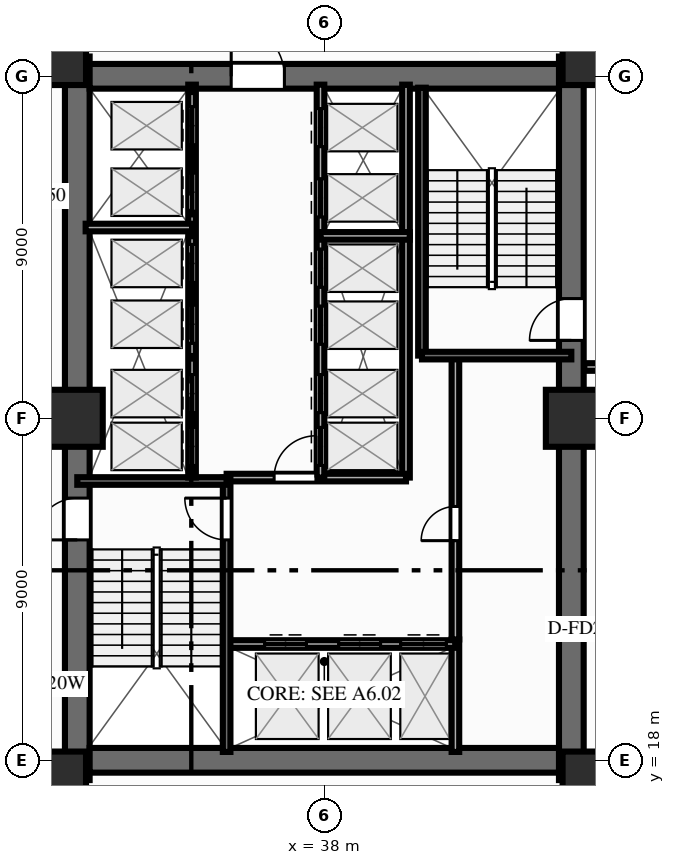
"""IFC4 building model, lengths in metres.
Left out: names, types, materials, properties, quantities, classifications, styles, units other than length and angle.
Written with IfcOpenShell. Run it as: python <this file> out.ifc"""

import sys

from ifc_helpers import new_model, si_unit, direction, frame, frame_2d, origin, origin_2d, place, context, subcontext, project, spatial, rectangle, extrude, source, transform, mapped, element, fill, save


model = new_model("IFC4")
c1 = context("Model", 3, precision=1e-05, world=origin(), true_north=direction((0.0, 1.0)))
c2 = subcontext(c1, "Body", "Model", "MODEL_VIEW")
j1 = project(units=[si_unit("LENGTHUNIT", "METRE"), si_unit("PLANEANGLEUNIT", "RADIAN")], contexts=[c1])
p1 = place(None, origin())
s1 = spatial("IfcSite", under=j1, at=p1, CompositionType="ELEMENT")
p2 = place(p1, origin())
s2 = spatial("IfcBuilding", under=s1, at=p2, CompositionType="ELEMENT")
p3 = place(p2, origin())
s3 = spatial("IfcBuildingStorey", under=s2, at=p3, CompositionType="ELEMENT", Elevation=0.0)
p4 = place(p3, frame((31.5, 17.48, 0.0), z_axis=(0.0, 0.0, 1.0), x_axis=(0.0, 1.0, 0.0)))
e1 = element("IfcWall", 1, at=p4, inside=s3, PredefinedType="SHEAR", context=c2, shape_type="SweptSolid", body=[
    extrude(rectangle(XDim=19.04, YDim=0.65, at=frame_2d((9.52, 0.0))), origin(), (0.0, 0.0, 1.0), 4.2),
])
p5 = place(p4, frame((6.32, 0.0, 0.0)))
e2 = element("IfcOpeningElement", 2, at=p5, cuts=e1, PredefinedType="OPENING", context=c2, shape_type="SweptSolid", body=[
    extrude(rectangle(XDim=1.1, YDim=2.15, at=frame_2d((0.55, 1.075))), frame((0.0, 0.337, 0.0), z_axis=(0.0, -1.0, 0.0), x_axis=(1.0, 0.0, 0.0)), (0.0, 0.0, 1.0), 0.674),
])
p6 = place(p3, frame((44.5, 17.48, 0.0), z_axis=(0.0, 0.0, 1.0), x_axis=(0.0, 1.0, 0.0)))
e3 = element("IfcWall", 3, at=p6, inside=s3, PredefinedType="SHEAR", context=c2, shape_type="SweptSolid", body=[
    extrude(rectangle(XDim=19.04, YDim=0.65, at=frame_2d((9.52, 0.0))), origin(), (0.0, 0.0, 1.0), 4.2),
])
p7 = place(p6, frame((12.67, 0.0, 0.0), z_axis=(0.0, 0.0, 1.0), x_axis=(-1.0, 0.0, 0.0)))
e4 = element("IfcOpeningElement", 4, at=p7, cuts=e3, PredefinedType="OPENING", context=c2, shape_type="SweptSolid", body=[
    extrude(rectangle(XDim=1.1, YDim=2.15, at=frame_2d((0.55, 1.075))), frame((0.0, 0.337, 0.0), z_axis=(0.0, -1.0, 0.0), x_axis=(1.0, 0.0, 0.0)), (0.0, 0.0, 1.0), 0.674),
])
p8 = place(p3, frame((31.825, 18.0, 0.0), z_axis=(0.0, 0.0, 1.0), x_axis=(1.0, 0.0, 0.0)))
e5 = element("IfcWall", 5, at=p8, inside=s3, PredefinedType="SHEAR", context=c2, shape_type="SweptSolid", body=[
    extrude(rectangle(XDim=12.35, YDim=0.65, at=frame_2d((6.175, 0.0))), origin(), (0.0, 0.0, 1.0), 4.2),
])
p9 = place(p3, frame((31.825, 36.0, 0.0), z_axis=(0.0, 0.0, 1.0), x_axis=(1.0, 0.0, 0.0)))
e6 = element("IfcWall", 6, at=p9, inside=s3, PredefinedType="SHEAR", context=c2, shape_type="SweptSolid", body=[
    extrude(rectangle(XDim=12.35, YDim=0.65, at=frame_2d((6.175, 0.0))), origin(), (0.0, 0.0, 1.0), 4.2),
])
p10 = place(p9, frame((5.125, 0.0, 0.0), z_axis=(0.0, 0.0, 1.0), x_axis=(-1.0, 0.0, 0.0)))
e7 = element("IfcOpeningElement", 7, at=p10, cuts=e6, PredefinedType="OPENING", context=c2, shape_type="SweptSolid", body=[
    extrude(rectangle(XDim=1.4, YDim=2.15, at=frame_2d((0.7, 1.075))), frame((0.0, 0.337, 0.0), z_axis=(0.0, -1.0, 0.0), x_axis=(1.0, 0.0, 0.0)), (0.0, 0.0, 1.0), 0.674),
])
m1 = source(origin(), c2, "Body", "SweptSolid", [
    extrude(rectangle(XDim=1.5, YDim=1.5, at=origin_2d()), origin(), (0.0, 0.0, 1.0), 4.2),
])
for number, where, z_axis, x_axis in (
    (8, (30.98, 17.48, 0.0), (0.0, 0.0, 1.0), (1.0, 0.0, 0.0)),
    (9, (45.02, 17.48, 0.0), (0.0, 0.0, 1.0), (1.0, 0.0, 0.0)),
    (10, (30.98, 36.52, 0.0), (0.0, 0.0, 1.0), (1.0, 0.0, 0.0)),
    (11, (45.02, 36.52, 0.0), (0.0, 0.0, 1.0), (1.0, 0.0, 0.0)),
    (12, (31.42, 27.0, 0.0), (0.0, 0.0, 1.0), (1.0, 0.0, 0.0)),
    (13, (44.58, 27.0, 0.0), (0.0, 0.0, 1.0), (1.0, 0.0, 0.0)),
):
    element("IfcColumn", number, at=place(p3, frame(where, z_axis=z_axis, x_axis=x_axis)), inside=s3, PredefinedType="COLUMN", context=c2, shape_type="MappedRepresentation", body=[
        mapped(m1, transform((0.0, 0.0, 0.0), scale=1.0)),
    ])
p11 = place(p3, frame((41.45, 18.22, 0.0), z_axis=(0.0, 0.0, 1.0), x_axis=(0.0, 1.0, 0.0)))
e14 = element("IfcWall", 14, at=p11, inside=s3, PredefinedType="PARTITIONING", context=c2, shape_type="SweptSolid", body=[
    extrude(rectangle(XDim=2.96, YDim=0.2, at=frame_2d((1.48, 0.0))), origin(), (0.0, 0.0, 1.0), 3.92),
])
p12 = place(p3, frame((41.45, 21.18, 0.0), z_axis=(0.0, 0.0, 1.0), x_axis=(0.0, 1.0, 0.0)))
e15 = element("IfcWall", 15, at=p12, inside=s3, PredefinedType="PARTITIONING", context=c2, shape_type="SweptSolid", body=[
    extrude(rectangle(XDim=7.42, YDim=0.2, at=frame_2d((3.71, 0.0))), origin(), (0.0, 0.0, 1.0), 3.92),
])
p13 = place(p12, frame((2.6, 0.0, 0.0)))
e16 = element("IfcOpeningElement", 16, at=p13, cuts=e15, PredefinedType="OPENING", context=c2, shape_type="SweptSolid", body=[
    extrude(rectangle(XDim=0.9, YDim=2.1, at=frame_2d((0.45, 1.05))), frame((0.0, 0.112, 0.0), z_axis=(0.0, -1.0, 0.0), x_axis=(1.0, 0.0, 0.0)), (0.0, 0.0, 1.0), 0.224),
])
p14 = place(p3, frame((40.15, 25.44, 0.0), z_axis=(0.0, 0.0, 1.0), x_axis=(0.0, 1.0, 0.0)))
e17 = element("IfcWall", 17, at=p14, inside=s3, PredefinedType="PARTITIONING", context=c2, shape_type="SweptSolid", body=[
    extrude(rectangle(XDim=6.36, YDim=0.2, at=frame_2d((3.18, 0.0))), origin(), (0.0, 0.0, 1.0), 3.92),
])
p15 = place(p3, frame((40.15, 31.8, 0.0), z_axis=(0.0, 0.0, 1.0), x_axis=(0.0, 1.0, 0.0)))
e18 = element("IfcWall", 18, at=p15, inside=s3, PredefinedType="PARTITIONING", context=c2, shape_type="SweptSolid", body=[
    extrude(rectangle(XDim=3.98, YDim=0.2, at=frame_2d((1.99, 0.0))), origin(), (0.0, 0.0, 1.0), 3.92),
])
p16 = place(p3, frame((35.43, 21.06, 0.0), z_axis=(0.0, 0.0, 1.0), x_axis=(1.0, 0.0, 0.0)))
e19 = element("IfcWall", 19, at=p16, inside=s3, PredefinedType="PARTITIONING", context=c2, shape_type="SweptSolid", body=[
    extrude(rectangle(XDim=6.02, YDim=0.2, at=frame_2d((3.01, 0.0))), origin(), (0.0, 0.0, 1.0), 3.92),
])
p17 = place(p16, frame((1.0, 0.0, 0.0)))
e20 = element("IfcOpeningElement", 20, at=p17, cuts=e19, PredefinedType="OPENING", context=c2, shape_type="SweptSolid", body=[
    extrude(rectangle(XDim=1.1, YDim=2.15, at=frame_2d((0.55, 1.075))), frame((0.0, 0.112, 0.0), z_axis=(0.0, -1.0, 0.0), x_axis=(1.0, 0.0, 0.0)), (0.0, 0.0, 1.0), 0.224),
])
p18 = place(p16, frame((2.95, 0.0, 0.0)))
e21 = element("IfcOpeningElement", 21, at=p18, cuts=e19, PredefinedType="OPENING", context=c2, shape_type="SweptSolid", body=[
    extrude(rectangle(XDim=1.1, YDim=2.15, at=frame_2d((0.55, 1.075))), frame((0.0, 0.112, 0.0), z_axis=(0.0, -1.0, 0.0), x_axis=(1.0, 0.0, 0.0)), (0.0, 0.0, 1.0), 0.224),
])
p19 = place(p16, frame((4.58, 0.0, 0.0)))
e22 = element("IfcOpeningElement", 22, at=p19, cuts=e19, PredefinedType="OPENING", context=c2, shape_type="SweptSolid", body=[
    extrude(rectangle(XDim=1.2, YDim=2.15, at=frame_2d((0.6, 1.075))), frame((0.0, 0.112, 0.0), z_axis=(0.0, -1.0, 0.0), x_axis=(1.0, 0.0, 0.0)), (0.0, 0.0, 1.0), 0.224),
])
p20 = place(p3, frame((35.43, 25.44, 0.0), z_axis=(0.0, 0.0, 1.0), x_axis=(1.0, 0.0, 0.0)))
e23 = element("IfcWall", 23, at=p20, inside=s3, PredefinedType="PARTITIONING", context=c2, shape_type="SweptSolid", body=[
    extrude(rectangle(XDim=4.72, YDim=0.2, at=frame_2d((2.36, 0.0))), origin(), (0.0, 0.0, 1.0), 3.92),
])
p21 = place(p20, frame((1.25, 0.0, 0.0)))
e24 = element("IfcOpeningElement", 24, at=p21, cuts=e23, PredefinedType="OPENING", context=c2, shape_type="SweptSolid", body=[
    extrude(rectangle(XDim=1.1, YDim=2.15, at=frame_2d((0.55, 1.075))), frame((0.0, 0.112, 0.0), z_axis=(0.0, -1.0, 0.0), x_axis=(1.0, 0.0, 0.0)), (0.0, 0.0, 1.0), 0.224),
])
p22 = place(p3, frame((35.43, 18.22, 0.0), z_axis=(0.0, 0.0, 1.0), x_axis=(0.0, 1.0, 0.0)))
e25 = element("IfcWall", 25, at=p22, inside=s3, PredefinedType="SOLIDWALL", context=c2, shape_type="SweptSolid", body=[
    extrude(rectangle(XDim=7.22, YDim=0.2, at=frame_2d((3.61, 0.0))), origin(), (0.0, 0.0, 1.0), 3.92),
])
p23 = place(p22, frame((6.68, 0.0, 0.0), z_axis=(0.0, 0.0, 1.0), x_axis=(-1.0, 0.0, 0.0)))
e26 = element("IfcOpeningElement", 26, at=p23, cuts=e25, PredefinedType="OPENING", context=c2, shape_type="SweptSolid", body=[
    extrude(rectangle(XDim=1.1, YDim=2.15, at=frame_2d((0.55, 1.075))), frame((0.0, 0.112, 0.0), z_axis=(0.0, -1.0, 0.0), x_axis=(1.0, 0.0, 0.0)), (0.0, 0.0, 1.0), 0.224),
])
p24 = place(p3, frame((31.5, 25.35, 0.0), z_axis=(0.0, 0.0, 1.0), x_axis=(1.0, 0.0, 0.0)))
e27 = element("IfcWall", 27, at=p24, inside=s3, PredefinedType="SOLIDWALL", context=c2, shape_type="SweptSolid", body=[
    extrude(rectangle(XDim=3.93, YDim=0.2, at=frame_2d((1.965, 0.0))), origin(), (0.0, 0.0, 1.0), 3.92),
])
p25 = place(p3, frame((40.57, 28.65, 0.0), z_axis=(0.0, 0.0, 1.0), x_axis=(0.0, 1.0, 0.0)))
e28 = element("IfcWall", 28, at=p25, inside=s3, PredefinedType="SOLIDWALL", context=c2, shape_type="SweptSolid", body=[
    extrude(rectangle(XDim=7.05, YDim=0.2, at=frame_2d((3.525, 0.0))), origin(), (0.0, 0.0, 1.0), 3.92),
])
p26 = place(p3, frame((40.57, 28.65, 0.0), z_axis=(0.0, 0.0, 1.0), x_axis=(1.0, 0.0, 0.0)))
e29 = element("IfcWall", 29, at=p26, inside=s3, PredefinedType="SOLIDWALL", context=c2, shape_type="SweptSolid", body=[
    extrude(rectangle(XDim=3.93, YDim=0.2, at=frame_2d((1.965, 0.0))), origin(), (0.0, 0.0, 1.0), 3.92),
])
p27 = place(p3, frame((34.52, 25.44, 0.0), z_axis=(0.0, 0.0, 1.0), x_axis=(0.0, 1.0, 0.0)))
e30 = element("IfcWall", 30, at=p27, inside=s3, PredefinedType="PARTITIONING", context=c2, shape_type="SweptSolid", body=[
    extrude(rectangle(XDim=10.34, YDim=0.2, at=frame_2d((5.17, 0.0))), origin(), (0.0, 0.0, 1.0), 3.92),
])
p28 = place(p27, frame((0.32, 0.0, 0.0)))
e31 = element("IfcOpeningElement", 31, at=p28, cuts=e30, PredefinedType="OPENING", context=c2, shape_type="SweptSolid", body=[
    extrude(rectangle(XDim=1.0, YDim=2.15, at=frame_2d((0.5, 1.075))), frame((0.0, 0.112, 0.0), z_axis=(0.0, -1.0, 0.0), x_axis=(1.0, 0.0, 0.0)), (0.0, 0.0, 1.0), 0.224),
])
p29 = place(p27, frame((1.71, 0.0, 0.0)))
e32 = element("IfcOpeningElement", 32, at=p29, cuts=e30, PredefinedType="OPENING", context=c2, shape_type="SweptSolid", body=[
    extrude(rectangle(XDim=1.0, YDim=2.15, at=frame_2d((0.5, 1.075))), frame((0.0, 0.112, 0.0), z_axis=(0.0, -1.0, 0.0), x_axis=(1.0, 0.0, 0.0)), (0.0, 0.0, 1.0), 0.224),
])
p30 = place(p27, frame((3.535, 0.0, 0.0)))
e33 = element("IfcOpeningElement", 33, at=p30, cuts=e30, PredefinedType="OPENING", context=c2, shape_type="SweptSolid", body=[
    extrude(rectangle(XDim=1.0, YDim=2.15, at=frame_2d((0.5, 1.075))), frame((0.0, 0.112, 0.0), z_axis=(0.0, -1.0, 0.0), x_axis=(1.0, 0.0, 0.0)), (0.0, 0.0, 1.0), 0.224),
])
p31 = place(p27, frame((5.135, 0.0, 0.0)))
e34 = element("IfcOpeningElement", 34, at=p31, cuts=e30, PredefinedType="OPENING", context=c2, shape_type="SweptSolid", body=[
    extrude(rectangle(XDim=1.0, YDim=2.15, at=frame_2d((0.5, 1.075))), frame((0.0, 0.112, 0.0), z_axis=(0.0, -1.0, 0.0), x_axis=(1.0, 0.0, 0.0)), (0.0, 0.0, 1.0), 0.224),
])
p32 = place(p27, frame((7.01, 0.0, 0.0)))
e35 = element("IfcOpeningElement", 35, at=p32, cuts=e30, PredefinedType="OPENING", context=c2, shape_type="SweptSolid", body=[
    extrude(rectangle(XDim=1.0, YDim=2.15, at=frame_2d((0.5, 1.075))), frame((0.0, 0.112, 0.0), z_axis=(0.0, -1.0, 0.0), x_axis=(1.0, 0.0, 0.0)), (0.0, 0.0, 1.0), 0.224),
])
p33 = place(p27, frame((8.76, 0.0, 0.0)))
e36 = element("IfcOpeningElement", 36, at=p33, cuts=e30, PredefinedType="OPENING", context=c2, shape_type="SweptSolid", body=[
    extrude(rectangle(XDim=1.0, YDim=2.15, at=frame_2d((0.5, 1.075))), frame((0.0, 0.112, 0.0), z_axis=(0.0, -1.0, 0.0), x_axis=(1.0, 0.0, 0.0)), (0.0, 0.0, 1.0), 0.224),
])
p34 = place(p3, frame((31.72, 32.02, 0.0), z_axis=(0.0, 0.0, 1.0), x_axis=(1.0, 0.0, 0.0)))
e37 = element("IfcWall", 37, at=p34, inside=s3, PredefinedType="PARTITIONING", context=c2, shape_type="SweptSolid", body=[
    extrude(rectangle(XDim=2.8, YDim=0.2, at=frame_2d((1.4, 0.0))), origin(), (0.0, 0.0, 1.0), 3.92),
])
p35 = place(p3, frame((37.9, 25.44, 0.0), z_axis=(0.0, 0.0, 1.0), x_axis=(0.0, 1.0, 0.0)))
e38 = element("IfcWall", 38, at=p35, inside=s3, PredefinedType="PARTITIONING", context=c2, shape_type="SweptSolid", body=[
    extrude(rectangle(XDim=10.34, YDim=0.2, at=frame_2d((5.17, 0.0))), origin(), (0.0, 0.0, 1.0), 3.92),
])
p36 = place(p35, frame((0.32, 0.0, 0.0)))
e39 = element("IfcOpeningElement", 39, at=p36, cuts=e38, PredefinedType="OPENING", context=c2, shape_type="SweptSolid", body=[
    extrude(rectangle(XDim=1.0, YDim=2.15, at=frame_2d((0.5, 1.075))), frame((0.0, 0.112, 0.0), z_axis=(0.0, -1.0, 0.0), x_axis=(1.0, 0.0, 0.0)), (0.0, 0.0, 1.0), 0.224),
])
p37 = place(p35, frame((1.71, 0.0, 0.0)))
e40 = element("IfcOpeningElement", 40, at=p37, cuts=e38, PredefinedType="OPENING", context=c2, shape_type="SweptSolid", body=[
    extrude(rectangle(XDim=1.0, YDim=2.15, at=frame_2d((0.5, 1.075))), frame((0.0, 0.112, 0.0), z_axis=(0.0, -1.0, 0.0), x_axis=(1.0, 0.0, 0.0)), (0.0, 0.0, 1.0), 0.224),
])
p38 = place(p35, frame((3.51, 0.0, 0.0)))
e41 = element("IfcOpeningElement", 41, at=p38, cuts=e38, PredefinedType="OPENING", context=c2, shape_type="SweptSolid", body=[
    extrude(rectangle(XDim=1.0, YDim=2.15, at=frame_2d((0.5, 1.075))), frame((0.0, 0.112, 0.0), z_axis=(0.0, -1.0, 0.0), x_axis=(1.0, 0.0, 0.0)), (0.0, 0.0, 1.0), 0.224),
])
p39 = place(p35, frame((5.01, 0.0, 0.0)))
e42 = element("IfcOpeningElement", 42, at=p39, cuts=e38, PredefinedType="OPENING", context=c2, shape_type="SweptSolid", body=[
    extrude(rectangle(XDim=1.0, YDim=2.15, at=frame_2d((0.5, 1.075))), frame((0.0, 0.112, 0.0), z_axis=(0.0, -1.0, 0.0), x_axis=(1.0, 0.0, 0.0)), (0.0, 0.0, 1.0), 0.224),
])
p40 = place(p35, frame((6.86, 0.0, 0.0)))
e43 = element("IfcOpeningElement", 43, at=p40, cuts=e38, PredefinedType="OPENING", context=c2, shape_type="SweptSolid", body=[
    extrude(rectangle(XDim=1.0, YDim=2.15, at=frame_2d((0.5, 1.075))), frame((0.0, 0.112, 0.0), z_axis=(0.0, -1.0, 0.0), x_axis=(1.0, 0.0, 0.0)), (0.0, 0.0, 1.0), 0.224),
])
p41 = place(p35, frame((8.71, 0.0, 0.0)))
e44 = element("IfcOpeningElement", 44, at=p41, cuts=e38, PredefinedType="OPENING", context=c2, shape_type="SweptSolid", body=[
    extrude(rectangle(XDim=1.0, YDim=2.15, at=frame_2d((0.5, 1.075))), frame((0.0, 0.112, 0.0), z_axis=(0.0, -1.0, 0.0), x_axis=(1.0, 0.0, 0.0)), (0.0, 0.0, 1.0), 0.224),
])
p42 = place(p3, frame((37.9, 31.8, 0.0), z_axis=(0.0, 0.0, 1.0), x_axis=(1.0, 0.0, 0.0)))
e45 = element("IfcWall", 45, at=p42, inside=s3, PredefinedType="PARTITIONING", context=c2, shape_type="SweptSolid", body=[
    extrude(rectangle(XDim=2.35, YDim=0.2, at=frame_2d((1.175, 0.0))), origin(), (0.0, 0.0, 1.0), 3.92),
])
p43 = place(p3, frame((44.84, 28.35, 0.0), z_axis=(0.0, 0.0, 1.0), x_axis=(1.0, 0.0, 0.0)))
e46 = element("IfcWall", 46, at=p43, inside=s3, PredefinedType="PARTITIONING", context=c2, shape_type="SweptSolid", body=[
    extrude(rectangle(XDim=2.16, YDim=0.2, at=frame_2d((1.08, 0.0))), origin(), (0.0, 0.0, 1.0), 3.92),
])
p44 = place(p43, frame((0.55, 0.0, 0.0)))
e47 = element("IfcOpeningElement", 47, at=p44, cuts=e46, PredefinedType="OPENING", context=c2, shape_type="SweptSolid", body=[
    extrude(rectangle(XDim=1.1, YDim=2.15, at=frame_2d((0.55, 1.075))), frame((0.0, 0.112, 0.0), z_axis=(0.0, -1.0, 0.0), x_axis=(1.0, 0.0, 0.0)), (0.0, 0.0, 1.0), 0.224),
])
p45 = place(p3, frame((44.84, 36.2, 0.0), z_axis=(0.0, 0.0, 1.0), x_axis=(1.0, 0.0, 0.0)))
e48 = element("IfcWall", 48, at=p45, inside=s3, PredefinedType="PARTITIONING", context=c2, shape_type="SweptSolid", body=[
    extrude(rectangle(XDim=3.46, YDim=0.2, at=frame_2d((1.73, 0.0))), origin(), (0.0, 0.0, 1.0), 3.29),
])
p46 = place(p45, frame((1.36, 0.0, 0.0)))
e49 = element("IfcOpeningElement", 49, at=p46, cuts=e48, PredefinedType="OPENING", context=c2, shape_type="SweptSolid", body=[
    extrude(rectangle(XDim=1.1, YDim=2.15, at=frame_2d((0.55, 1.075))), frame((0.0, 0.112, 0.0), z_axis=(0.0, -1.0, 0.0), x_axis=(1.0, 0.0, 0.0)), (0.0, 0.0, 1.0), 0.224),
])
m2 = source(origin(), c2, "Body", "SweptSolid", [
    extrude(rectangle(XDim=1.1, YDim=2.15, at=frame_2d((0.55, 1.075))), frame((0.0, 0.025, 0.0), z_axis=(0.0, -1.0, 0.0), x_axis=(1.0, 0.0, 0.0)), (0.0, 0.0, 1.0), 0.05),
])
p47 = place(p5, origin())
e50 = element("IfcDoor", 50, at=p47, inside=s3, OperationType="SINGLE_SWING_LEFT", PredefinedType="DOOR", context=c2, shape_type="MappedRepresentation", body=[
    mapped(m2, transform((0.0, 0.0, 0.0), scale=1.0)),
])
fill(e2, e50)
p48 = place(p7, origin())
e51 = element("IfcDoor", 51, at=p48, inside=s3, OperationType="SINGLE_SWING_RIGHT", PredefinedType="DOOR", context=c2, shape_type="MappedRepresentation", body=[
    mapped(m2, transform((0.0, 0.0, 0.0), scale=1.0)),
])
fill(e4, e51)
m3 = source(origin(), c2, "Body", "SweptSolid", [
    extrude(rectangle(XDim=1.4, YDim=2.15, at=frame_2d((0.7, 1.075))), frame((0.0, 0.025, 0.0), z_axis=(0.0, -1.0, 0.0), x_axis=(1.0, 0.0, 0.0)), (0.0, 0.0, 1.0), 0.05),
])
p49 = place(p10, origin())
e52 = element("IfcDoor", 52, at=p49, inside=s3, OperationType="SINGLE_SWING_RIGHT", PredefinedType="DOOR", context=c2, shape_type="MappedRepresentation", body=[
    mapped(m3, transform((0.0, 0.0, 0.0), scale=1.0)),
])
fill(e7, e52)
m4 = source(origin(), c2, "Body", "SweptSolid", [
    extrude(rectangle(XDim=0.9, YDim=2.1, at=frame_2d((0.45, 1.05))), frame((0.0, 0.025, 0.0), z_axis=(0.0, -1.0, 0.0), x_axis=(1.0, 0.0, 0.0)), (0.0, 0.0, 1.0), 0.05),
])
p50 = place(p13, origin())
e53 = element("IfcDoor", 53, at=p50, inside=s3, OperationType="SINGLE_SWING_LEFT", PredefinedType="DOOR", context=c2, shape_type="MappedRepresentation", body=[
    mapped(m4, transform((0.0, 0.0, 0.0), scale=1.0)),
])
fill(e16, e53)
p51 = place(p17, origin())
e54 = element("IfcDoor", 54, at=p51, inside=s3, OperationType="DOUBLE_DOOR_SLIDING", PredefinedType="DOOR", context=c2, shape_type="MappedRepresentation", body=[
    mapped(m2, transform((0.0, 0.0, 0.0), scale=1.0)),
])
fill(e20, e54)
p52 = place(p18, origin())
e55 = element("IfcDoor", 55, at=p52, inside=s3, OperationType="DOUBLE_DOOR_SLIDING", PredefinedType="DOOR", context=c2, shape_type="MappedRepresentation", body=[
    mapped(m2, transform((0.0, 0.0, 0.0), scale=1.0)),
])
fill(e21, e55)
m5 = source(origin(), c2, "Body", "SweptSolid", [
    extrude(rectangle(XDim=1.2, YDim=2.15, at=frame_2d((0.6, 1.075))), frame((0.0, 0.025, 0.0), z_axis=(0.0, -1.0, 0.0), x_axis=(1.0, 0.0, 0.0)), (0.0, 0.0, 1.0), 0.05),
])
p53 = place(p19, origin())
e56 = element("IfcDoor", 56, at=p53, inside=s3, OperationType="DOUBLE_DOOR_SLIDING", PredefinedType="DOOR", context=c2, shape_type="MappedRepresentation", body=[
    mapped(m5, transform((0.0, 0.0, 0.0), scale=1.0)),
])
fill(e22, e56)
p54 = place(p21, origin())
e57 = element("IfcDoor", 57, at=p54, inside=s3, OperationType="SINGLE_SWING_RIGHT", PredefinedType="DOOR", context=c2, shape_type="MappedRepresentation", body=[
    mapped(m2, transform((0.0, 0.0, 0.0), scale=1.0)),
])
fill(e24, e57)
p55 = place(p23, origin())
e58 = element("IfcDoor", 58, at=p55, inside=s3, OperationType="SINGLE_SWING_LEFT", PredefinedType="DOOR", context=c2, shape_type="MappedRepresentation", body=[
    mapped(m2, transform((0.0, 0.0, 0.0), scale=1.0)),
])
fill(e26, e58)
m6 = source(origin(), c2, "Body", "SweptSolid", [
    extrude(rectangle(XDim=1.0, YDim=2.15, at=frame_2d((0.5, 1.075))), frame((0.0, 0.025, 0.0), z_axis=(0.0, -1.0, 0.0), x_axis=(1.0, 0.0, 0.0)), (0.0, 0.0, 1.0), 0.05),
])
p56 = place(p28, origin())
e59 = element("IfcDoor", 59, at=p56, inside=s3, OperationType="DOUBLE_DOOR_SLIDING", PredefinedType="DOOR", context=c2, shape_type="MappedRepresentation", body=[
    mapped(m6, transform((0.0, 0.0, 0.0), scale=1.0)),
])
fill(e31, e59)
p57 = place(p29, origin())
e60 = element("IfcDoor", 60, at=p57, inside=s3, OperationType="DOUBLE_DOOR_SLIDING", PredefinedType="DOOR", context=c2, shape_type="MappedRepresentation", body=[
    mapped(m6, transform((0.0, 0.0, 0.0), scale=1.0)),
])
fill(e32, e60)
p58 = place(p30, origin())
e61 = element("IfcDoor", 61, at=p58, inside=s3, OperationType="DOUBLE_DOOR_SLIDING", PredefinedType="DOOR", context=c2, shape_type="MappedRepresentation", body=[
    mapped(m6, transform((0.0, 0.0, 0.0), scale=1.0)),
])
fill(e33, e61)
p59 = place(p31, origin())
e62 = element("IfcDoor", 62, at=p59, inside=s3, OperationType="DOUBLE_DOOR_SLIDING", PredefinedType="DOOR", context=c2, shape_type="MappedRepresentation", body=[
    mapped(m6, transform((0.0, 0.0, 0.0), scale=1.0)),
])
fill(e34, e62)
p60 = place(p32, origin())
e63 = element("IfcDoor", 63, at=p60, inside=s3, OperationType="DOUBLE_DOOR_SLIDING", PredefinedType="DOOR", context=c2, shape_type="MappedRepresentation", body=[
    mapped(m6, transform((0.0, 0.0, 0.0), scale=1.0)),
])
fill(e35, e63)
p61 = place(p33, origin())
e64 = element("IfcDoor", 64, at=p61, inside=s3, OperationType="DOUBLE_DOOR_SLIDING", PredefinedType="DOOR", context=c2, shape_type="MappedRepresentation", body=[
    mapped(m6, transform((0.0, 0.0, 0.0), scale=1.0)),
])
fill(e36, e64)
p62 = place(p36, origin())
e65 = element("IfcDoor", 65, at=p62, inside=s3, OperationType="DOUBLE_DOOR_SLIDING", PredefinedType="DOOR", context=c2, shape_type="MappedRepresentation", body=[
    mapped(m6, transform((0.0, 0.0, 0.0), scale=1.0)),
])
fill(e39, e65)
p63 = place(p37, origin())
e66 = element("IfcDoor", 66, at=p63, inside=s3, OperationType="DOUBLE_DOOR_SLIDING", PredefinedType="DOOR", context=c2, shape_type="MappedRepresentation", body=[
    mapped(m6, transform((0.0, 0.0, 0.0), scale=1.0)),
])
fill(e40, e66)
p64 = place(p38, origin())
e67 = element("IfcDoor", 67, at=p64, inside=s3, OperationType="DOUBLE_DOOR_SLIDING", PredefinedType="DOOR", context=c2, shape_type="MappedRepresentation", body=[
    mapped(m6, transform((0.0, 0.0, 0.0), scale=1.0)),
])
fill(e41, e67)
p65 = place(p39, origin())
e68 = element("IfcDoor", 68, at=p65, inside=s3, OperationType="DOUBLE_DOOR_SLIDING", PredefinedType="DOOR", context=c2, shape_type="MappedRepresentation", body=[
    mapped(m6, transform((0.0, 0.0, 0.0), scale=1.0)),
])
fill(e42, e68)
p66 = place(p40, origin())
e69 = element("IfcDoor", 69, at=p66, inside=s3, OperationType="DOUBLE_DOOR_SLIDING", PredefinedType="DOOR", context=c2, shape_type="MappedRepresentation", body=[
    mapped(m6, transform((0.0, 0.0, 0.0), scale=1.0)),
])
fill(e43, e69)
p67 = place(p41, origin())
e70 = element("IfcDoor", 70, at=p67, inside=s3, OperationType="DOUBLE_DOOR_SLIDING", PredefinedType="DOOR", context=c2, shape_type="MappedRepresentation", body=[
    mapped(m6, transform((0.0, 0.0, 0.0), scale=1.0)),
])
fill(e44, e70)
save(model, sys.argv[1])
